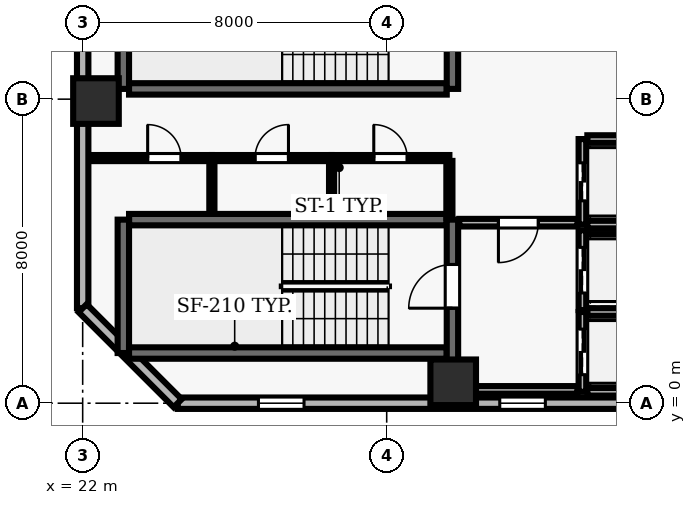
"""IFC4 building model, lengths in metres.
Left out: names, types, materials, properties, quantities, classifications, styles, units other than length and angle.
Written with IfcOpenShell. Run it as: python <this file> out.ifc"""

import sys

from ifc_helpers import new_model, si_unit, direction, frame, frame_2d, origin, origin_2d, place, context, subcontext, project, spatial, rectangle, extrude, element, fill, save


model = new_model("IFC4")
c1 = context("Model", 3, precision=1e-05, world=origin(), true_north=direction((0.0, 1.0)))
c2 = subcontext(c1, "Body", "Model", "MODEL_VIEW")
j1 = project(units=[si_unit("LENGTHUNIT", "METRE"), si_unit("PLANEANGLEUNIT", "RADIAN")], contexts=[c1])
p1 = place(None, origin())
s1 = spatial("IfcSite", under=j1, at=p1, CompositionType="ELEMENT")
p2 = place(p1, origin())
s2 = spatial("IfcBuilding", under=s1, at=p2, CompositionType="ELEMENT")
p3 = place(p2, frame((0.0, 0.0, 150.2)))
s3 = spatial("IfcBuildingStorey", under=s2, at=p3, CompositionType="ELEMENT", Elevation=150.2)
for number, where, z_axis, x_axis in (
    (1, (31.75, 0.55, 0.0), (0.0, 0.0, 1.0), (1.0, 0.0, 0.0)),
    (2, (22.35, 7.95, 0.0), (0.0, 0.0, 1.0), (1.0, 0.0, 0.0)),
):
    element("IfcColumn", number, at=place(p3, frame(where, z_axis=z_axis, x_axis=x_axis)), inside=s3, PredefinedType="COLUMN", context=c2, shape_type="SweptSolid", body=[
        extrude(rectangle(XDim=1.2, YDim=1.2, at=origin_2d()), origin(), (0.0, 0.0, 1.0), 3.9),
    ])
p4 = place(p3, frame((24.5, 0.0, 0.0), z_axis=(0.0, 0.0, 1.0), x_axis=(1.0, 0.0, 0.0)))
e3 = element("IfcWall", 3, at=p4, inside=s3, PredefinedType="SOLIDWALL", context=c2, shape_type="SweptSolid", body=[
    extrude(rectangle(XDim=43.6, YDim=0.3, at=frame_2d((21.8, 0.0))), origin(), (0.0, 0.0, 1.0), 3.69),
])
p5 = place(p4, frame((2.125, 0.0, 0.9)))
e4 = element("IfcOpeningElement", 4, at=p5, cuts=e3, PredefinedType="OPENING", context=c2, shape_type="SweptSolid", body=[
    extrude(rectangle(XDim=1.2, YDim=1.6, at=frame_2d((0.6, 0.8))), frame((0.0, 0.16, 0.0), z_axis=(0.0, -1.0, 0.0), x_axis=(1.0, 0.0, 0.0)), (0.0, 0.0, 1.0), 0.32),
])
p6 = place(p4, frame((8.475, 0.0, 0.9)))
e5 = element("IfcOpeningElement", 5, at=p6, cuts=e3, PredefinedType="OPENING", context=c2, shape_type="SweptSolid", body=[
    extrude(rectangle(XDim=1.2, YDim=1.6, at=frame_2d((0.6, 0.8))), frame((0.0, 0.16, 0.0), z_axis=(0.0, -1.0, 0.0), x_axis=(1.0, 0.0, 0.0)), (0.0, 0.0, 1.0), 0.32),
])
p7 = place(p4, frame((18.475, 0.0, 0.9)))
e6 = element("IfcOpeningElement", 6, at=p7, cuts=e3, PredefinedType="OPENING", context=c2, shape_type="SweptSolid", body=[
    extrude(rectangle(XDim=1.2, YDim=1.6, at=frame_2d((0.6, 0.8))), frame((0.0, 0.16, 0.0), z_axis=(0.0, -1.0, 0.0), x_axis=(1.0, 0.0, 0.0)), (0.0, 0.0, 1.0), 0.32),
])
p8 = place(p4, frame((23.025, 0.0, 0.9)))
e7 = element("IfcOpeningElement", 7, at=p8, cuts=e3, PredefinedType="OPENING", context=c2, shape_type="SweptSolid", body=[
    extrude(rectangle(XDim=1.2, YDim=1.6, at=frame_2d((0.6, 0.8))), frame((0.0, 0.16, 0.0), z_axis=(0.0, -1.0, 0.0), x_axis=(1.0, 0.0, 0.0)), (0.0, 0.0, 1.0), 0.32),
])
p9 = place(p4, frame((29.375, 0.0, 0.9)))
e8 = element("IfcOpeningElement", 8, at=p9, cuts=e3, PredefinedType="OPENING", context=c2, shape_type="SweptSolid", body=[
    extrude(rectangle(XDim=1.2, YDim=1.6, at=frame_2d((0.6, 0.8))), frame((0.0, 0.16, 0.0), z_axis=(0.0, -1.0, 0.0), x_axis=(1.0, 0.0, 0.0)), (0.0, 0.0, 1.0), 0.32),
])
p10 = place(p4, frame((40.275, 0.0, 0.9)))
e9 = element("IfcOpeningElement", 9, at=p10, cuts=e3, PredefinedType="OPENING", context=c2, shape_type="SweptSolid", body=[
    extrude(rectangle(XDim=1.2, YDim=1.6, at=frame_2d((0.6, 0.8))), frame((0.0, 0.16, 0.0), z_axis=(0.0, -1.0, 0.0), x_axis=(1.0, 0.0, 0.0)), (0.0, 0.0, 1.0), 0.32),
])
p11 = place(p3, frame((22.0, 46.1, 0.0), z_axis=(0.0, 0.0, 1.0), x_axis=(0.0, -1.0, 0.0)))
e10 = element("IfcWall", 10, at=p11, inside=s3, PredefinedType="SOLIDWALL", context=c2, shape_type="SweptSolid", body=[
    extrude(rectangle(XDim=43.6, YDim=0.3, at=frame_2d((21.8, 0.0))), origin(), (0.0, 0.0, 1.0), 3.69),
])
p12 = place(p11, frame((6.5, 0.0, 0.0)))
e11 = element("IfcOpeningElement", 11, at=p12, cuts=e10, PredefinedType="OPENING", context=c2, shape_type="SweptSolid", body=[
    extrude(rectangle(XDim=1.0, YDim=2.2, at=frame_2d((0.5, 1.1))), frame((0.0, 0.16, 0.0), z_axis=(0.0, -1.0, 0.0), x_axis=(1.0, 0.0, 0.0)), (0.0, 0.0, 1.0), 0.32),
])
p13 = place(p11, frame((12.125, 0.0, 0.9)))
e12 = element("IfcOpeningElement", 12, at=p13, cuts=e10, PredefinedType="OPENING", context=c2, shape_type="SweptSolid", body=[
    extrude(rectangle(XDim=1.2, YDim=1.6, at=frame_2d((0.6, 0.8))), frame((0.0, 0.16, 0.0), z_axis=(0.0, -1.0, 0.0), x_axis=(1.0, 0.0, 0.0)), (0.0, 0.0, 1.0), 0.32),
])
p14 = place(p11, frame((18.025, 0.0, 0.9)))
e13 = element("IfcOpeningElement", 13, at=p14, cuts=e10, PredefinedType="OPENING", context=c2, shape_type="SweptSolid", body=[
    extrude(rectangle(XDim=1.2, YDim=1.6, at=frame_2d((0.6, 0.8))), frame((0.0, 0.16, 0.0), z_axis=(0.0, -1.0, 0.0), x_axis=(1.0, 0.0, 0.0)), (0.0, 0.0, 1.0), 0.32),
])
p15 = place(p11, frame((23.925, 0.0, 0.9)))
e14 = element("IfcOpeningElement", 14, at=p15, cuts=e10, PredefinedType="OPENING", context=c2, shape_type="SweptSolid", body=[
    extrude(rectangle(XDim=1.2, YDim=1.6, at=frame_2d((0.6, 0.8))), frame((0.0, 0.16, 0.0), z_axis=(0.0, -1.0, 0.0), x_axis=(1.0, 0.0, 0.0)), (0.0, 0.0, 1.0), 0.32),
])
p16 = place(p11, frame((29.375, 0.0, 0.9)))
e15 = element("IfcOpeningElement", 15, at=p16, cuts=e10, PredefinedType="OPENING", context=c2, shape_type="SweptSolid", body=[
    extrude(rectangle(XDim=1.2, YDim=1.6, at=frame_2d((0.6, 0.8))), frame((0.0, 0.16, 0.0), z_axis=(0.0, -1.0, 0.0), x_axis=(1.0, 0.0, 0.0)), (0.0, 0.0, 1.0), 0.32),
])
p17 = place(p11, frame((34.825, 0.0, 0.9)))
e16 = element("IfcOpeningElement", 16, at=p17, cuts=e10, PredefinedType="OPENING", context=c2, shape_type="SweptSolid", body=[
    extrude(rectangle(XDim=1.2, YDim=1.6, at=frame_2d((0.6, 0.8))), frame((0.0, 0.16, 0.0), z_axis=(0.0, -1.0, 0.0), x_axis=(1.0, 0.0, 0.0)), (0.0, 0.0, 1.0), 0.32),
])
p18 = place(p3, frame((22.0, 2.5, 0.0), z_axis=(0.0, 0.0, 1.0), x_axis=(0.707106781187, -0.707106781187, 0.0)))
e17 = element("IfcWall", 17, at=p18, inside=s3, PredefinedType="SOLIDWALL", context=c2, shape_type="SweptSolid", body=[
    extrude(rectangle(XDim=3.536, YDim=0.3, at=frame_2d((1.768, 0.0))), origin(), (0.0, 0.0, 1.0), 3.69),
])
p19 = place(p3, frame((31.58, 4.83, 0.0), z_axis=(0.0, 0.0, 1.0), x_axis=(-1.0, 0.0, 0.0)))
e18 = element("IfcWall", 18, at=p19, inside=s3, PredefinedType="SHEAR", context=c2, shape_type="SweptSolid", body=[
    extrude(rectangle(XDim=8.36, YDim=0.3, at=frame_2d((4.18, 0.0))), origin(), (0.0, 0.0, 1.0), 3.69),
])
p20 = place(p3, frame((23.07, 4.83, 0.0), z_axis=(0.0, 0.0, 1.0), x_axis=(0.0, -1.0, 0.0)))
e19 = element("IfcWall", 19, at=p20, inside=s3, PredefinedType="SHEAR", context=c2, shape_type="SweptSolid", body=[
    extrude(rectangle(XDim=3.51, YDim=0.3, at=frame_2d((1.755, 0.0))), origin(), (0.0, 0.0, 1.0), 3.69),
])
p21 = place(p3, frame((23.22, 1.32, 0.0), z_axis=(0.0, 0.0, 1.0), x_axis=(1.0, 0.0, 0.0)))
e20 = element("IfcWall", 20, at=p21, inside=s3, PredefinedType="SHEAR", context=c2, shape_type="SweptSolid", body=[
    extrude(rectangle(XDim=8.36, YDim=0.3, at=frame_2d((4.18, 0.0))), origin(), (0.0, 0.0, 1.0), 3.69),
])
p22 = place(p3, frame((31.73, 0.96, 0.0), z_axis=(0.0, 0.0, 1.0), x_axis=(0.0, 1.0, 0.0)))
e21 = element("IfcWall", 21, at=p22, inside=s3, PredefinedType="SHEAR", context=c2, shape_type="SweptSolid", body=[
    extrude(rectangle(XDim=3.87, YDim=0.3, at=frame_2d((1.935, 0.0))), origin(), (0.0, 0.0, 1.0), 3.69),
])
p23 = place(p22, frame((1.54, 0.0, 0.0)))
e22 = element("IfcOpeningElement", 22, at=p23, cuts=e21, PredefinedType="OPENING", context=c2, shape_type="SweptSolid", body=[
    extrude(rectangle(XDim=1.15, YDim=2.15, at=frame_2d((0.575, 1.075))), frame((0.0, 0.16, 0.0), z_axis=(0.0, -1.0, 0.0), x_axis=(1.0, 0.0, 0.0)), (0.0, 0.0, 1.0), 0.32),
])
p24 = place(p3, frame((23.07, 11.78, 0.0), z_axis=(0.0, 0.0, 1.0), x_axis=(0.0, -1.0, 0.0)))
e23 = element("IfcWall", 23, at=p24, inside=s3, PredefinedType="SHEAR", context=c2, shape_type="SweptSolid", body=[
    extrude(rectangle(XDim=3.51, YDim=0.3, at=frame_2d((1.755, 0.0))), origin(), (0.0, 0.0, 1.0), 3.69),
])
p25 = place(p3, frame((23.22, 8.27, 0.0), z_axis=(0.0, 0.0, 1.0), x_axis=(1.0, 0.0, 0.0)))
e24 = element("IfcWall", 24, at=p25, inside=s3, PredefinedType="SHEAR", context=c2, shape_type="SweptSolid", body=[
    extrude(rectangle(XDim=8.36, YDim=0.3, at=frame_2d((4.18, 0.0))), origin(), (0.0, 0.0, 1.0), 3.69),
])
p26 = place(p3, frame((31.73, 8.27, 0.0), z_axis=(0.0, 0.0, 1.0), x_axis=(0.0, 1.0, 0.0)))
e25 = element("IfcWall", 25, at=p26, inside=s3, PredefinedType="SHEAR", context=c2, shape_type="SweptSolid", body=[
    extrude(rectangle(XDim=3.51, YDim=0.3, at=frame_2d((1.755, 0.0))), origin(), (0.0, 0.0, 1.0), 3.69),
])
p27 = place(p26, frame((1.18, 0.0, 0.0)))
e26 = element("IfcOpeningElement", 26, at=p27, cuts=e25, PredefinedType="OPENING", context=c2, shape_type="SweptSolid", body=[
    extrude(rectangle(XDim=1.15, YDim=2.15, at=frame_2d((0.575, 1.075))), frame((0.0, 0.16, 0.0), z_axis=(0.0, -1.0, 0.0), x_axis=(1.0, 0.0, 0.0)), (0.0, 0.0, 1.0), 0.32),
])
p28 = place(p3, frame((35.15, 2.4, 0.0), z_axis=(0.0, 0.0, 1.0), x_axis=(0.0, -1.0, 0.0)))
e27 = element("IfcWall", 27, at=p28, inside=s3, PredefinedType="SOLIDWALL", context=c2, shape_type="SweptSolid", body=[
    extrude(rectangle(XDim=2.1, YDim=0.2, at=frame_2d((1.05, 0.0))), origin(), (0.0, 0.0, 1.0), 3.69),
])
p29 = place(p28, frame((0.45, 0.0, 0.0)))
e28 = element("IfcOpeningElement", 28, at=p29, cuts=e27, PredefinedType="OPENING", context=c2, shape_type="SweptSolid", body=[
    extrude(rectangle(XDim=1.2, YDim=2.15, at=frame_2d((0.6, 1.075))), frame((0.0, 0.11, 0.0), z_axis=(0.0, -1.0, 0.0), x_axis=(1.0, 0.0, 0.0)), (0.0, 0.0, 1.0), 0.22),
])
for number, where, z_axis, x_axis in (
    (29, (35.28, 0.3, 0.0), (0.0, 0.0, 1.0), (1.0, 0.0, 0.0)),
    (30, (37.42, 2.4, 0.0), (0.0, 0.0, 1.0), (-1.0, 0.0, 0.0)),
):
    element("IfcWall", number, at=place(p3, frame(where, z_axis=z_axis, x_axis=x_axis)), inside=s3, PredefinedType="SOLIDWALL", context=c2, shape_type="SweptSolid", body=[
        extrude(rectangle(XDim=2.14, YDim=0.2, at=frame_2d((1.07, 0.0))), origin(), (0.0, 0.0, 1.0), 3.69),
    ])
p30 = place(p3, frame((35.15, 4.55, 0.0), z_axis=(0.0, 0.0, 1.0), x_axis=(0.0, -1.0, 0.0)))
e31 = element("IfcWall", 31, at=p30, inside=s3, PredefinedType="SOLIDWALL", context=c2, shape_type="SweptSolid", body=[
    extrude(rectangle(XDim=2.1, YDim=0.2, at=frame_2d((1.05, 0.0))), origin(), (0.0, 0.0, 1.0), 3.69),
])
p31 = place(p30, frame((0.45, 0.0, 0.0)))
e32 = element("IfcOpeningElement", 32, at=p31, cuts=e31, PredefinedType="OPENING", context=c2, shape_type="SweptSolid", body=[
    extrude(rectangle(XDim=1.2, YDim=2.15, at=frame_2d((0.6, 1.075))), frame((0.0, 0.11, 0.0), z_axis=(0.0, -1.0, 0.0), x_axis=(1.0, 0.0, 0.0)), (0.0, 0.0, 1.0), 0.22),
])
p32 = place(p3, frame((37.42, 4.55, 0.0), z_axis=(0.0, 0.0, 1.0), x_axis=(-1.0, 0.0, 0.0)))
e33 = element("IfcWall", 33, at=p32, inside=s3, PredefinedType="SOLIDWALL", context=c2, shape_type="SweptSolid", body=[
    extrude(rectangle(XDim=2.14, YDim=0.2, at=frame_2d((1.07, 0.0))), origin(), (0.0, 0.0, 1.0), 3.69),
])
p33 = place(p3, frame((35.15, 6.95, 0.0), z_axis=(0.0, 0.0, 1.0), x_axis=(0.0, -1.0, 0.0)))
e34 = element("IfcWall", 34, at=p33, inside=s3, PredefinedType="SOLIDWALL", context=c2, shape_type="SweptSolid", body=[
    extrude(rectangle(XDim=2.25, YDim=0.2, at=frame_2d((1.125, 0.0))), origin(), (0.0, 0.0, 1.0), 3.69),
])
p34 = place(p33, frame((0.625, 0.0, 0.0)))
e35 = element("IfcOpeningElement", 35, at=p34, cuts=e34, PredefinedType="OPENING", context=c2, shape_type="SweptSolid", body=[
    extrude(rectangle(XDim=1.0, YDim=2.1, at=frame_2d((0.5, 1.05))), frame((0.0, 0.11, 0.0), z_axis=(0.0, -1.0, 0.0), x_axis=(1.0, 0.0, 0.0)), (0.0, 0.0, 1.0), 0.22),
])
for number, where, z_axis, x_axis in (
    (36, (35.28, 4.7, 0.0), (0.0, 0.0, 1.0), (1.0, 0.0, 0.0)),
    (37, (37.42, 6.95, 0.0), (0.0, 0.0, 1.0), (-1.0, 0.0, 0.0)),
):
    element("IfcWall", number, at=place(p3, frame(where, z_axis=z_axis, x_axis=x_axis)), inside=s3, PredefinedType="SOLIDWALL", context=c2, shape_type="SweptSolid", body=[
        extrude(rectangle(XDim=2.14, YDim=0.2, at=frame_2d((1.07, 0.0))), origin(), (0.0, 0.0, 1.0), 3.69),
    ])
p35 = place(p3, frame((22.2, 6.45, 0.0), z_axis=(0.0, 0.0, 1.0), x_axis=(1.0, 0.0, 0.0)))
e38 = element("IfcWall", 38, at=p35, inside=s3, PredefinedType="PARTITIONING", context=c2, shape_type="SweptSolid", body=[
    extrude(rectangle(XDim=3.2, YDim=0.16, at=frame_2d((1.6, 0.0))), origin(), (0.0, 0.0, 1.0), 3.69),
])
p36 = place(p35, frame((1.51, 0.0, 0.0)))
e39 = element("IfcOpeningElement", 39, at=p36, cuts=e38, PredefinedType="OPENING", context=c2, shape_type="SweptSolid", body=[
    extrude(rectangle(XDim=0.88, YDim=2.1, at=frame_2d((0.44, 1.05))), frame((0.0, 0.09, 0.0), z_axis=(0.0, -1.0, 0.0), x_axis=(1.0, 0.0, 0.0)), (0.0, 0.0, 1.0), 0.18),
])
p37 = place(p3, frame((25.4, 6.45, 0.0), z_axis=(0.0, 0.0, 1.0), x_axis=(1.0, 0.0, 0.0)))
e40 = element("IfcWall", 40, at=p37, inside=s3, PredefinedType="PARTITIONING", context=c2, shape_type="SweptSolid", body=[
    extrude(rectangle(XDim=3.15, YDim=0.16, at=frame_2d((1.575, 0.0))), origin(), (0.0, 0.0, 1.0), 3.69),
])
p38 = place(p37, frame((1.135, 0.0, 0.0)))
e41 = element("IfcOpeningElement", 41, at=p38, cuts=e40, PredefinedType="OPENING", context=c2, shape_type="SweptSolid", body=[
    extrude(rectangle(XDim=0.88, YDim=2.1, at=frame_2d((0.44, 1.05))), frame((0.0, 0.09, 0.0), z_axis=(0.0, -1.0, 0.0), x_axis=(1.0, 0.0, 0.0)), (0.0, 0.0, 1.0), 0.18),
])
p39 = place(p3, frame((28.55, 6.45, 0.0), z_axis=(0.0, 0.0, 1.0), x_axis=(1.0, 0.0, 0.0)))
e42 = element("IfcWall", 42, at=p39, inside=s3, PredefinedType="PARTITIONING", context=c2, shape_type="SweptSolid", body=[
    extrude(rectangle(XDim=3.1, YDim=0.16, at=frame_2d((1.55, 0.0))), origin(), (0.0, 0.0, 1.0), 3.69),
])
p40 = place(p39, frame((1.11, 0.0, 0.0)))
e43 = element("IfcOpeningElement", 43, at=p40, cuts=e42, PredefinedType="OPENING", context=c2, shape_type="SweptSolid", body=[
    extrude(rectangle(XDim=0.88, YDim=2.1, at=frame_2d((0.44, 1.05))), frame((0.0, 0.09, 0.0), z_axis=(0.0, -1.0, 0.0), x_axis=(1.0, 0.0, 0.0)), (0.0, 0.0, 1.0), 0.18),
])
p41 = place(p3, frame((31.65, 0.35, 0.0), z_axis=(0.0, 0.0, 1.0), x_axis=(1.0, 0.0, 0.0)))
e44 = element("IfcWall", 44, at=p41, inside=s3, PredefinedType="SOLIDWALL", context=c2, shape_type="SweptSolid", body=[
    extrude(rectangle(XDim=3.37, YDim=0.2, at=frame_2d((1.685, 0.0))), origin(), (0.0, 0.0, 1.0), 3.69),
])
p42 = place(p3, frame((35.02, 4.75, 0.0), z_axis=(0.0, 0.0, 1.0), x_axis=(-1.0, 0.0, 0.0)))
e45 = element("IfcWall", 45, at=p42, inside=s3, PredefinedType="SOLIDWALL", context=c2, shape_type="SweptSolid", body=[
    extrude(rectangle(XDim=3.11, YDim=0.2, at=frame_2d((1.555, 0.0))), origin(), (0.0, 0.0, 1.0), 3.69),
])
p43 = place(p42, frame((1.03, 0.0, 0.0)))
e46 = element("IfcOpeningElement", 46, at=p43, cuts=e45, PredefinedType="OPENING", context=c2, shape_type="SweptSolid", body=[
    extrude(rectangle(XDim=1.05, YDim=2.15, at=frame_2d((0.525, 1.075))), frame((0.0, 0.11, 0.0), z_axis=(0.0, -1.0, 0.0), x_axis=(1.0, 0.0, 0.0)), (0.0, 0.0, 1.0), 0.22),
])
for number, where, z_axis, x_axis in (
    (47, (25.4, 5.01, 0.0), (0.0, 0.0, 1.0), (0.0, 1.0, 0.0)),
    (48, (28.55, 5.01, 0.0), (0.0, 0.0, 1.0), (0.0, 1.0, 0.0)),
):
    element("IfcWall", number, at=place(p3, frame(where, z_axis=z_axis, x_axis=x_axis)), inside=s3, PredefinedType="PARTITIONING", context=c2, shape_type="SweptSolid", body=[
        extrude(rectangle(XDim=1.365, YDim=0.135, at=frame_2d((0.683, 0.0))), origin(), (0.0, 0.0, 1.0), 3.69),
    ])
p44 = place(p3, frame((31.65, 4.86, 0.0), z_axis=(0.0, 0.0, 1.0), x_axis=(0.0, 1.0, 0.0)))
e49 = element("IfcWall", 49, at=p44, inside=s3, PredefinedType="PARTITIONING", context=c2, shape_type="SweptSolid", body=[
    extrude(rectangle(XDim=1.515, YDim=0.16, at=frame_2d((0.757, 0.0))), origin(), (0.0, 0.0, 1.0), 3.69),
])
p45 = place(p5, origin())
e50 = element("IfcWindow", 50, at=p45, inside=s3, PartitioningType="SINGLE_PANEL", PredefinedType="WINDOW", context=c2, shape_type="SweptSolid", body=[
    extrude(rectangle(XDim=1.2, YDim=1.6, at=frame_2d((0.6, 0.8))), frame((0.0, 0.03, 0.0), z_axis=(0.0, -1.0, 0.0), x_axis=(1.0, 0.0, 0.0)), (0.0, 0.0, 1.0), 0.06),
])
fill(e4, e50)
p46 = place(p6, origin())
e51 = element("IfcWindow", 51, at=p46, inside=s3, PartitioningType="SINGLE_PANEL", PredefinedType="WINDOW", context=c2, shape_type="SweptSolid", body=[
    extrude(rectangle(XDim=1.2, YDim=1.6, at=frame_2d((0.6, 0.8))), frame((0.0, 0.03, 0.0), z_axis=(0.0, -1.0, 0.0), x_axis=(1.0, 0.0, 0.0)), (0.0, 0.0, 1.0), 0.06),
])
fill(e5, e51)
p47 = place(p23, origin())
e52 = element("IfcDoor", 52, at=p47, inside=s3, OperationType="SINGLE_SWING_LEFT", PredefinedType="DOOR", context=c2, shape_type="SweptSolid", body=[
    extrude(rectangle(XDim=1.15, YDim=2.15, at=frame_2d((0.575, 1.075))), frame((0.0, 0.025, 0.0), z_axis=(0.0, -1.0, 0.0), x_axis=(1.0, 0.0, 0.0)), (0.0, 0.0, 1.0), 0.05),
])
fill(e22, e52)
p48 = place(p29, origin())
e53 = element("IfcDoor", 53, at=p48, inside=s3, OperationType="DOUBLE_DOOR_SLIDING", PredefinedType="DOOR", context=c2, shape_type="SweptSolid", body=[
    extrude(rectangle(XDim=1.2, YDim=2.15, at=frame_2d((0.6, 1.075))), frame((0.0, 0.025, 0.0), z_axis=(0.0, -1.0, 0.0), x_axis=(1.0, 0.0, 0.0)), (0.0, 0.0, 1.0), 0.05),
])
fill(e28, e53)
p49 = place(p31, origin())
e54 = element("IfcDoor", 54, at=p49, inside=s3, OperationType="DOUBLE_DOOR_SLIDING", PredefinedType="DOOR", context=c2, shape_type="SweptSolid", body=[
    extrude(rectangle(XDim=1.2, YDim=2.15, at=frame_2d((0.6, 1.075))), frame((0.0, 0.025, 0.0), z_axis=(0.0, -1.0, 0.0), x_axis=(1.0, 0.0, 0.0)), (0.0, 0.0, 1.0), 0.05),
])
fill(e32, e54)
p50 = place(p34, origin())
e55 = element("IfcDoor", 55, at=p50, inside=s3, OperationType="DOUBLE_DOOR_SLIDING", PredefinedType="DOOR", context=c2, shape_type="SweptSolid", body=[
    extrude(rectangle(XDim=1.0, YDim=2.1, at=frame_2d((0.5, 1.05))), frame((0.0, 0.025, 0.0), z_axis=(0.0, -1.0, 0.0), x_axis=(1.0, 0.0, 0.0)), (0.0, 0.0, 1.0), 0.05),
])
fill(e35, e55)
p51 = place(p43, origin())
e56 = element("IfcDoor", 56, at=p51, inside=s3, OperationType="SINGLE_SWING_RIGHT", PredefinedType="DOOR", context=c2, shape_type="SweptSolid", body=[
    extrude(rectangle(XDim=1.05, YDim=2.15, at=frame_2d((0.525, 1.075))), frame((0.0, 0.025, 0.0), z_axis=(0.0, -1.0, 0.0), x_axis=(1.0, 0.0, 0.0)), (0.0, 0.0, 1.0), 0.05),
])
fill(e46, e56)
p52 = place(p36, origin())
e57 = element("IfcDoor", 57, at=p52, inside=s3, OperationType="SINGLE_SWING_LEFT", PredefinedType="DOOR", context=c2, shape_type="SweptSolid", body=[
    extrude(rectangle(XDim=0.88, YDim=2.1, at=frame_2d((0.44, 1.05))), frame((0.0, 0.025, 0.0), z_axis=(0.0, -1.0, 0.0), x_axis=(1.0, 0.0, 0.0)), (0.0, 0.0, 1.0), 0.05),
])
fill(e39, e57)
p53 = place(p38, origin())
e58 = element("IfcDoor", 58, at=p53, inside=s3, OperationType="SINGLE_SWING_RIGHT", PredefinedType="DOOR", context=c2, shape_type="SweptSolid", body=[
    extrude(rectangle(XDim=0.88, YDim=2.1, at=frame_2d((0.44, 1.05))), frame((0.0, 0.025, 0.0), z_axis=(0.0, -1.0, 0.0), x_axis=(1.0, 0.0, 0.0)), (0.0, 0.0, 1.0), 0.05),
])
fill(e41, e58)
p54 = place(p40, origin())
e59 = element("IfcDoor", 59, at=p54, inside=s3, OperationType="SINGLE_SWING_LEFT", PredefinedType="DOOR", context=c2, shape_type="SweptSolid", body=[
    extrude(rectangle(XDim=0.88, YDim=2.1, at=frame_2d((0.44, 1.05))), frame((0.0, 0.025, 0.0), z_axis=(0.0, -1.0, 0.0), x_axis=(1.0, 0.0, 0.0)), (0.0, 0.0, 1.0), 0.05),
])
fill(e43, e59)
save(model, sys.argv[1])
